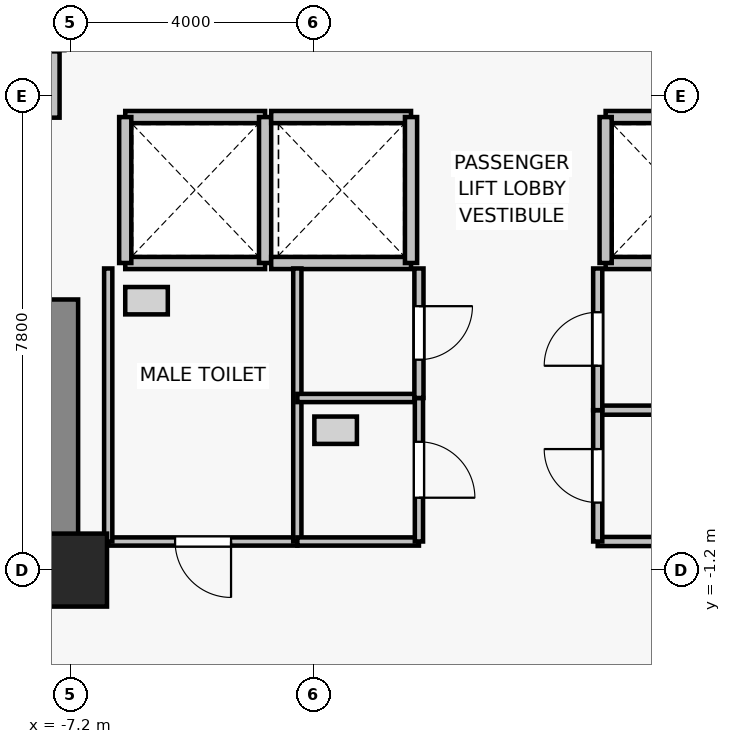
"""IFC4 building model, lengths in metres.
Left out: names, types, materials, properties, quantities, classifications, styles, units other than length and angle.
Written with IfcOpenShell. Run it as: python <this file> out.ifc"""

import sys

from ifc_helpers import new_model, si_unit, direction, frame, frame_2d, origin, origin_2d, place, context, subcontext, project, spatial, rectangle, extrude, source, transform, mapped, element, fill, save


model = new_model("IFC4")
c1 = context("Model", 3, precision=1e-05, world=origin(), true_north=direction((0.0, 1.0)))
c2 = subcontext(c1, "Body", "Model", "MODEL_VIEW")
j1 = project(units=[si_unit("LENGTHUNIT", "METRE"), si_unit("PLANEANGLEUNIT", "RADIAN")], contexts=[c1])
p1 = place(None, origin())
s1 = spatial("IfcSite", under=j1, at=p1, CompositionType="ELEMENT")
p2 = place(p1, origin())
s2 = spatial("IfcBuilding", under=s1, at=p2, CompositionType="ELEMENT")
p3 = place(p2, frame((0.0, 0.0, 70.3)))
s3 = spatial("IfcBuildingStorey", under=s2, at=p3, CompositionType="ELEMENT", Elevation=70.3)
p4 = place(p3, frame((-7.2, -1.2, 0.0), z_axis=(0.0, 0.0, 1.0), x_axis=(1.0, 0.0, 0.0)))
e1 = element("IfcColumn", 1, at=p4, inside=s3, PredefinedType="COLUMN", context=c2, shape_type="SweptSolid", body=[
    extrude(rectangle(XDim=1.2, YDim=1.2, at=origin_2d()), origin(), (0.0, 0.0, 1.0), 3.3),
])
p5 = place(p3, frame((-7.4, -0.75, 0.0), z_axis=(0.0, 0.0, 1.0), x_axis=(0.0, 1.0, 0.0)))
e2 = element("IfcWall", 2, at=p5, inside=s3, PredefinedType="SHEAR", context=c2, shape_type="SweptSolid", body=[
    extrude(rectangle(XDim=4.0, YDim=0.65, at=frame_2d((2.0, 0.0))), origin(), (0.0, 0.0, 1.0), 3.075),
])
for number, where, z_axis, x_axis in (
    (3, (-4.0, 3.85, 0.0), (0.0, 0.0, 1.0), (-1.0, 0.0, 0.0)),
    (4, (-6.3, 6.25, 0.0), (0.0, 0.0, 1.0), (1.0, 0.0, 0.0)),
):
    element("IfcWall", number, at=place(p3, frame(where, z_axis=z_axis, x_axis=x_axis)), inside=s3, PredefinedType="SOLIDWALL", context=c2, shape_type="SweptSolid", body=[
        extrude(rectangle(XDim=2.3, YDim=0.2, at=frame_2d((1.15, 0.0))), origin(), (0.0, 0.0, 1.0), 3.075),
    ])
for number, where, z_axis, x_axis in (
    (5, (-6.3, 3.85, 0.0), (0.0, 0.0, 1.0), (0.0, 1.0, 0.0)),
    (6, (-4.0, 6.25, 0.0), (0.0, 0.0, 1.0), (0.0, -1.0, 0.0)),
):
    element("IfcWall", number, at=place(p3, frame(where, z_axis=z_axis, x_axis=x_axis)), inside=s3, PredefinedType="SOLIDWALL", context=c2, shape_type="SweptSolid", body=[
        extrude(rectangle(XDim=2.4, YDim=0.2, at=frame_2d((1.2, 0.0))), origin(), (0.0, 0.0, 1.0), 3.075),
    ])
for number, where, z_axis, x_axis in (
    (7, (-1.6, 3.85, 0.0), (0.0, 0.0, 1.0), (-1.0, 0.0, 0.0)),
    (8, (-3.9, 6.25, 0.0), (0.0, 0.0, 1.0), (1.0, 0.0, 0.0)),
):
    element("IfcWall", number, at=place(p3, frame(where, z_axis=z_axis, x_axis=x_axis)), inside=s3, PredefinedType="SOLIDWALL", context=c2, shape_type="SweptSolid", body=[
        extrude(rectangle(XDim=2.3, YDim=0.2, at=frame_2d((1.15, 0.0))), origin(), (0.0, 0.0, 1.0), 3.075),
    ])
p6 = place(p3, frame((-1.6, 6.25, 0.0), z_axis=(0.0, 0.0, 1.0), x_axis=(0.0, -1.0, 0.0)))
e9 = element("IfcWall", 9, at=p6, inside=s3, PredefinedType="SOLIDWALL", context=c2, shape_type="SweptSolid", body=[
    extrude(rectangle(XDim=2.4, YDim=0.2, at=frame_2d((1.2, 0.0))), origin(), (0.0, 0.0, 1.0), 3.075),
])
for number, where, z_axis, x_axis in (
    (10, (3.9, 3.85, 0.0), (0.0, 0.0, 1.0), (-1.0, 0.0, 0.0)),
    (11, (1.6, 6.25, 0.0), (0.0, 0.0, 1.0), (1.0, 0.0, 0.0)),
):
    element("IfcWall", number, at=place(p3, frame(where, z_axis=z_axis, x_axis=x_axis)), inside=s3, PredefinedType="SOLIDWALL", context=c2, shape_type="SweptSolid", body=[
        extrude(rectangle(XDim=2.3, YDim=0.2, at=frame_2d((1.15, 0.0))), origin(), (0.0, 0.0, 1.0), 3.075),
    ])
p7 = place(p3, frame((1.6, 3.85, 0.0), z_axis=(0.0, 0.0, 1.0), x_axis=(0.0, 1.0, 0.0)))
e12 = element("IfcWall", 12, at=p7, inside=s3, PredefinedType="SOLIDWALL", context=c2, shape_type="SweptSolid", body=[
    extrude(rectangle(XDim=2.4, YDim=0.2, at=frame_2d((1.2, 0.0))), origin(), (0.0, 0.0, 1.0), 3.075),
])
p8 = place(p3, frame((-7.4, 7.35, 0.0), z_axis=(0.0, 0.0, 1.0), x_axis=(-1.0, 0.0, 0.0)))
e13 = element("IfcWall", 13, at=p8, inside=s3, PredefinedType="SOLIDWALL", context=c2, shape_type="SweptSolid", body=[
    extrude(rectangle(XDim=2.2, YDim=0.2, at=frame_2d((1.1, 0.0))), origin(), (0.0, 0.0, 1.0), 2.465),
])
p9 = place(p3, frame((-7.47, 7.33, 0.0), z_axis=(0.0, 0.0, 1.0), x_axis=(0.0, -1.0, 0.0)))
e14 = element("IfcWall", 14, at=p9, inside=s3, PredefinedType="PARTITIONING", context=c2, shape_type="SweptSolid", body=[
    extrude(rectangle(XDim=1.09, YDim=0.18, at=frame_2d((0.545, 0.0))), origin(), (0.0, 0.0, 1.0), 2.465),
])
p10 = place(p3, frame((-3.47, -0.73, 0.0), z_axis=(0.0, 0.0, 1.0), x_axis=(-1.0, 0.0, 0.0)))
e15 = element("IfcWall", 15, at=p10, inside=s3, PredefinedType="PARTITIONING", context=c2, shape_type="SweptSolid", body=[
    extrude(rectangle(XDim=3.11, YDim=0.135, at=frame_2d((1.555, 0.0))), origin(), (0.0, 0.0, 1.0), 3.075),
])
p11 = place(p10, frame((1.09, 0.0, 0.0)))
e16 = element("IfcOpeningElement", 16, at=p11, cuts=e15, PredefinedType="OPENING", context=c2, shape_type="SweptSolid", body=[
    extrude(rectangle(XDim=0.92, YDim=2.1, at=frame_2d((0.46, 1.05))), frame((0.0, 0.077, 0.0), z_axis=(0.0, -1.0, 0.0), x_axis=(1.0, 0.0, 0.0)), (0.0, 0.0, 1.0), 0.155),
])
for number, where, z_axis, x_axis in (
    (17, (-6.58, -0.73, 0.0), (0.0, 0.0, 1.0), (0.0, 1.0, 0.0)),
    (18, (-3.47, 3.76, 0.0), (0.0, 0.0, 1.0), (0.0, -1.0, 0.0)),
):
    element("IfcWall", number, at=place(p3, frame(where, z_axis=z_axis, x_axis=x_axis)), inside=s3, PredefinedType="PARTITIONING", context=c2, shape_type="SweptSolid", body=[
        extrude(rectangle(XDim=4.49, YDim=0.135, at=frame_2d((2.245, 0.0))), origin(), (0.0, 0.0, 1.0), 3.075),
    ])
for number, where, z_axis, x_axis in (
    (19, (-1.47, -0.73, 0.0), (0.0, 0.0, 1.0), (-1.0, 0.0, 0.0)),
    (20, (-3.47, 1.63, 0.0), (0.0, 0.0, 1.0), (1.0, 0.0, 0.0)),
):
    element("IfcWall", number, at=place(p3, frame(where, z_axis=z_axis, x_axis=x_axis)), inside=s3, PredefinedType="PARTITIONING", context=c2, shape_type="SweptSolid", body=[
        extrude(rectangle(XDim=2.0, YDim=0.135, at=frame_2d((1.0, 0.0))), origin(), (0.0, 0.0, 1.0), 3.075),
    ])
p12 = place(p3, frame((-1.47, 1.63, 0.0), z_axis=(0.0, 0.0, 1.0), x_axis=(0.0, -1.0, 0.0)))
e21 = element("IfcWall", 21, at=p12, inside=s3, PredefinedType="PARTITIONING", context=c2, shape_type="SweptSolid", body=[
    extrude(rectangle(XDim=2.36, YDim=0.135, at=frame_2d((1.18, 0.0))), origin(), (0.0, 0.0, 1.0), 3.075),
])
p13 = place(p12, frame((0.72, 0.0, 0.0)))
e22 = element("IfcOpeningElement", 22, at=p13, cuts=e21, PredefinedType="OPENING", context=c2, shape_type="SweptSolid", body=[
    extrude(rectangle(XDim=0.92, YDim=2.1, at=frame_2d((0.46, 1.05))), frame((0.0, 0.077, 0.0), z_axis=(0.0, -1.0, 0.0), x_axis=(1.0, 0.0, 0.0)), (0.0, 0.0, 1.0), 0.155),
])
p14 = place(p3, frame((-1.47, 3.76, 0.0), z_axis=(0.0, 0.0, 1.0), x_axis=(0.0, -1.0, 0.0)))
e23 = element("IfcWall", 23, at=p14, inside=s3, PredefinedType="PARTITIONING", context=c2, shape_type="SweptSolid", body=[
    extrude(rectangle(XDim=2.13, YDim=0.15, at=frame_2d((1.065, 0.0))), origin(), (0.0, 0.0, 1.0), 3.075),
])
p15 = place(p14, frame((0.62, 0.0, 0.0)))
e24 = element("IfcOpeningElement", 24, at=p15, cuts=e23, PredefinedType="OPENING", context=c2, shape_type="SweptSolid", body=[
    extrude(rectangle(XDim=0.88, YDim=2.1, at=frame_2d((0.44, 1.05))), frame((0.0, 0.085, 0.0), z_axis=(0.0, -1.0, 0.0), x_axis=(1.0, 0.0, 0.0)), (0.0, 0.0, 1.0), 0.17),
])
for number, where, z_axis, x_axis in (
    (25, (3.68, -0.73, 0.0), (0.0, 0.0, 1.0), (-1.0, 0.0, 0.0)),
    (26, (1.47, 1.43, 0.0), (0.0, 0.0, 1.0), (1.0, 0.0, 0.0)),
):
    element("IfcWall", number, at=place(p3, frame(where, z_axis=z_axis, x_axis=x_axis)), inside=s3, PredefinedType="PARTITIONING", context=c2, shape_type="SweptSolid", body=[
        extrude(rectangle(XDim=2.21, YDim=0.15, at=frame_2d((1.105, 0.0))), origin(), (0.0, 0.0, 1.0), 3.075),
    ])
p16 = place(p3, frame((1.47, -0.73, 0.0), z_axis=(0.0, 0.0, 1.0), x_axis=(0.0, 1.0, 0.0)))
e27 = element("IfcWall", 27, at=p16, inside=s3, PredefinedType="PARTITIONING", context=c2, shape_type="SweptSolid", body=[
    extrude(rectangle(XDim=2.16, YDim=0.15, at=frame_2d((1.08, 0.0))), origin(), (0.0, 0.0, 1.0), 3.075),
])
p17 = place(p16, frame((0.64, 0.0, 0.0)))
e28 = element("IfcOpeningElement", 28, at=p17, cuts=e27, PredefinedType="OPENING", context=c2, shape_type="SweptSolid", body=[
    extrude(rectangle(XDim=0.88, YDim=2.1, at=frame_2d((0.44, 1.05))), frame((0.0, 0.085, 0.0), z_axis=(0.0, -1.0, 0.0), x_axis=(1.0, 0.0, 0.0)), (0.0, 0.0, 1.0), 0.17),
])
p18 = place(p3, frame((1.47, 1.43, 0.0), z_axis=(0.0, 0.0, 1.0), x_axis=(0.0, 1.0, 0.0)))
e29 = element("IfcWall", 29, at=p18, inside=s3, PredefinedType="PARTITIONING", context=c2, shape_type="SweptSolid", body=[
    extrude(rectangle(XDim=2.33, YDim=0.15, at=frame_2d((1.165, 0.0))), origin(), (0.0, 0.0, 1.0), 3.075),
])
p19 = place(p18, frame((0.73, 0.0, 0.0)))
e30 = element("IfcOpeningElement", 30, at=p19, cuts=e29, PredefinedType="OPENING", context=c2, shape_type="SweptSolid", body=[
    extrude(rectangle(XDim=0.88, YDim=2.15, at=frame_2d((0.44, 1.075))), frame((0.0, 0.085, 0.0), z_axis=(0.0, -1.0, 0.0), x_axis=(1.0, 0.0, 0.0)), (0.0, 0.0, 1.0), 0.17),
])
m1 = source(origin(), c2, "Body", "SweptSolid", [
    extrude(rectangle(XDim=0.92, YDim=2.1, at=frame_2d((0.46, 1.05))), frame((0.0, 0.025, 0.0), z_axis=(0.0, -1.0, 0.0), x_axis=(1.0, 0.0, 0.0)), (0.0, 0.0, 1.0), 0.05),
])
p20 = place(p11, origin())
e31 = element("IfcDoor", 31, at=p20, inside=s3, OperationType="SINGLE_SWING_LEFT", PredefinedType="DOOR", context=c2, shape_type="MappedRepresentation", body=[
    mapped(m1, transform((0.0, 0.0, 0.0), x_axis=(1.0, 0.0, 0.0), y_axis=(0.0, 1.0, 0.0), z_axis=(0.0, 0.0, 1.0), scale=1.0)),
])
fill(e16, e31)
p21 = place(p13, origin())
e32 = element("IfcDoor", 32, at=p21, inside=s3, OperationType="SINGLE_SWING_RIGHT", PredefinedType="DOOR", context=c2, shape_type="MappedRepresentation", body=[
    mapped(m1, transform((0.0, 0.0, 0.0), x_axis=(1.0, 0.0, 0.0), y_axis=(0.0, 1.0, 0.0), z_axis=(0.0, 0.0, 1.0), scale=1.0)),
])
fill(e22, e32)
m2 = source(origin(), c2, "Body", "SweptSolid", [
    extrude(rectangle(XDim=0.88, YDim=2.1, at=frame_2d((0.44, 1.05))), frame((0.0, 0.025, 0.0), z_axis=(0.0, -1.0, 0.0), x_axis=(1.0, 0.0, 0.0)), (0.0, 0.0, 1.0), 0.05),
])
p22 = place(p15, origin())
e33 = element("IfcDoor", 33, at=p22, inside=s3, OperationType="SINGLE_SWING_LEFT", PredefinedType="DOOR", context=c2, shape_type="MappedRepresentation", body=[
    mapped(m2, transform((0.0, 0.0, 0.0), x_axis=(1.0, 0.0, 0.0), y_axis=(0.0, 1.0, 0.0), z_axis=(0.0, 0.0, 1.0), scale=1.0)),
])
fill(e24, e33)
p23 = place(p17, origin())
e34 = element("IfcDoor", 34, at=p23, inside=s3, OperationType="SINGLE_SWING_RIGHT", PredefinedType="DOOR", context=c2, shape_type="MappedRepresentation", body=[
    mapped(m2, transform((0.0, 0.0, 0.0), x_axis=(1.0, 0.0, 0.0), y_axis=(0.0, 1.0, 0.0), z_axis=(0.0, 0.0, 1.0), scale=1.0)),
])
fill(e28, e34)
m3 = source(origin(), c2, "Body", "SweptSolid", [
    extrude(rectangle(XDim=0.88, YDim=2.15, at=frame_2d((0.44, 1.075))), frame((0.0, 0.025, 0.0), z_axis=(0.0, -1.0, 0.0), x_axis=(1.0, 0.0, 0.0)), (0.0, 0.0, 1.0), 0.05),
])
p24 = place(p19, origin())
e35 = element("IfcDoor", 35, at=p24, inside=s3, OperationType="SINGLE_SWING_LEFT", PredefinedType="DOOR", context=c2, shape_type="MappedRepresentation", body=[
    mapped(m3, transform((0.0, 0.0, 0.0), x_axis=(1.0, 0.0, 0.0), y_axis=(0.0, 1.0, 0.0), z_axis=(0.0, 0.0, 1.0), scale=1.0)),
])
fill(e30, e35)
save(model, sys.argv[1])
